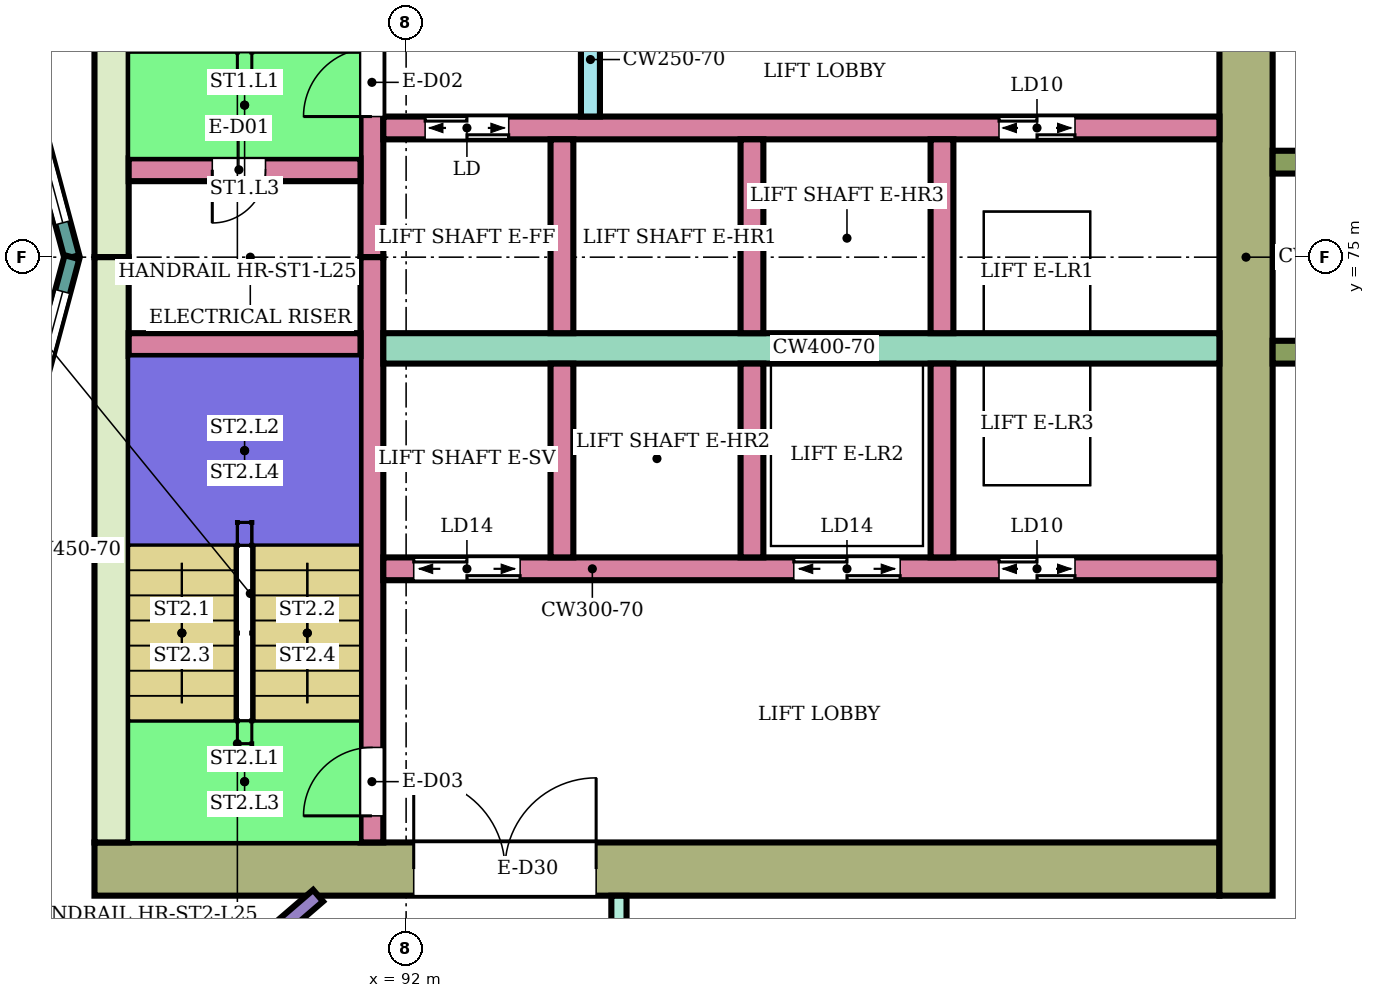
"""IFC4 building model, lengths in metres.
Left out: names, types, materials, properties, quantities, classifications, styles, units other than length and angle.
Written with IfcOpenShell. Run it as: python <this file> out.ifc"""

import sys

from ifc_helpers import new_model, si_unit, direction, frame, frame_2d, origin, place, context, subcontext, project, spatial, rectangle, extrude, element, fill, save


model = new_model("IFC4")
c1 = context("Model", 3, precision=1e-05, world=origin(), true_north=direction((0.0, 1.0)))
c2 = subcontext(c1, "Body", "Model", "MODEL_VIEW")
j1 = project(units=[si_unit("LENGTHUNIT", "METRE"), si_unit("PLANEANGLEUNIT", "RADIAN")], contexts=[c1])
p1 = place(None, origin())
s1 = spatial("IfcSite", under=j1, at=p1, CompositionType="ELEMENT")
p2 = place(p1, origin())
s2 = spatial("IfcBuilding", under=s1, at=p2, CompositionType="ELEMENT")
p3 = place(p2, frame((0.0, 0.0, 109.0)))
s3 = spatial("IfcBuildingStorey", under=s2, at=p3, CompositionType="ELEMENT", Elevation=109.0)
p4 = place(p3, frame((87.9, 66.95, 0.0), z_axis=(0.0, 0.0, 1.0), x_axis=(1.0, 0.0, 0.0)))
e1 = element("IfcWall", 1, at=p4, inside=s3, PredefinedType="SHEAR", context=c2, shape_type="SweptSolid", body=[
    extrude(rectangle(XDim=14.8, YDim=0.7, at=frame_2d((7.4, 0.0))), origin(), (0.0, 0.0, 1.0), 5.28),
])
p5 = place(p4, frame((4.2, 0.0, 0.0)))
e2 = element("IfcOpeningElement", 2, at=p5, cuts=e1, PredefinedType="OPENING", context=c2, shape_type="SweptSolid", body=[
    extrude(rectangle(XDim=2.4, YDim=2.4, at=frame_2d((1.2, 1.2))), frame((0.0, 0.36, 0.0), z_axis=(0.0, -1.0, 0.0), x_axis=(1.0, 0.0, 0.0)), (0.0, 0.0, 1.0), 0.72),
])
for number, where, z_axis, x_axis in (
    (3, (88.125, 75.0, 0.0), (0.0, 0.0, 1.0), (0.0, 1.0, 0.0)),
    (4, (88.125, 67.3, 0.0), (0.0, 0.0, 1.0), (0.0, 1.0, 0.0)),
):
    element("IfcWall", number, at=place(p3, frame(where, z_axis=z_axis, x_axis=x_axis)), inside=s3, PredefinedType="SHEAR", context=c2, shape_type="SweptSolid", body=[
        extrude(rectangle(XDim=7.7, YDim=0.45, at=frame_2d((3.85, 0.0))), origin(), (0.0, 0.0, 1.0), 5.28),
    ])
p6 = place(p3, frame((103.05, 66.6, 0.0), z_axis=(0.0, 0.0, 1.0), x_axis=(0.0, 1.0, 0.0)))
e5 = element("IfcWall", 5, at=p6, inside=s3, PredefinedType="SHEAR", context=c2, shape_type="SweptSolid", body=[
    extrude(rectangle(XDim=16.8, YDim=0.7, at=frame_2d((8.4, 0.0))), origin(), (0.0, 0.0, 1.0), 5.28),
])
p7 = place(p3, frame((91.55, 75.0, 0.0), z_axis=(0.0, 0.0, 1.0), x_axis=(0.0, 1.0, 0.0)))
e6 = element("IfcWall", 6, at=p7, inside=s3, PredefinedType="SHEAR", context=c2, shape_type="SweptSolid", body=[
    extrude(rectangle(XDim=7.7, YDim=0.3, at=frame_2d((3.85, 0.0))), origin(), (0.0, 0.0, 1.0), 5.28),
])
p8 = place(p7, frame((1.85, 0.0, 0.0)))
e7 = element("IfcOpeningElement", 7, at=p8, cuts=e6, PredefinedType="OPENING", context=c2, shape_type="SweptSolid", body=[
    extrude(rectangle(XDim=0.9, YDim=2.1, at=frame_2d((0.45, 1.05))), frame((0.0, 0.16, 0.0), z_axis=(0.0, -1.0, 0.0), x_axis=(1.0, 0.0, 0.0)), (0.0, 0.0, 1.0), 0.32),
])
p9 = place(p3, frame((91.55, 67.3, 0.0), z_axis=(0.0, 0.0, 1.0), x_axis=(0.0, 1.0, 0.0)))
e8 = element("IfcWall", 8, at=p9, inside=s3, PredefinedType="SHEAR", context=c2, shape_type="SweptSolid", body=[
    extrude(rectangle(XDim=7.7, YDim=0.3, at=frame_2d((3.85, 0.0))), origin(), (0.0, 0.0, 1.0), 5.28),
])
p10 = place(p9, frame((0.35, 0.0, 0.0)))
e9 = element("IfcOpeningElement", 9, at=p10, cuts=e8, PredefinedType="OPENING", context=c2, shape_type="SweptSolid", body=[
    extrude(rectangle(XDim=0.9, YDim=2.1, at=frame_2d((0.45, 1.05))), frame((0.0, 0.16, 0.0), z_axis=(0.0, -1.0, 0.0), x_axis=(1.0, 0.0, 0.0)), (0.0, 0.0, 1.0), 0.32),
])
p11 = place(p3, frame((88.35, 76.15, 0.0), z_axis=(0.0, 0.0, 1.0), x_axis=(1.0, 0.0, 0.0)))
e10 = element("IfcWall", 10, at=p11, inside=s3, PredefinedType="SHEAR", context=c2, shape_type="SweptSolid", body=[
    extrude(rectangle(XDim=3.05, YDim=0.3, at=frame_2d((1.525, 0.0))), origin(), (0.0, 0.0, 1.0), 5.28),
])
p12 = place(p11, frame((1.1, 0.0, 0.0)))
e11 = element("IfcOpeningElement", 11, at=p12, cuts=e10, PredefinedType="OPENING", context=c2, shape_type="SweptSolid", body=[
    extrude(rectangle(XDim=0.7, YDim=2.0, at=frame_2d((0.35, 1.0))), frame((0.0, 0.16, 0.0), z_axis=(0.0, -1.0, 0.0), x_axis=(1.0, 0.0, 0.0)), (0.0, 0.0, 1.0), 0.32),
])
p13 = place(p3, frame((88.35, 73.85, 0.0), z_axis=(0.0, 0.0, 1.0), x_axis=(1.0, 0.0, 0.0)))
e12 = element("IfcWall", 12, at=p13, inside=s3, PredefinedType="SHEAR", context=c2, shape_type="SweptSolid", body=[
    extrude(rectangle(XDim=3.05, YDim=0.3, at=frame_2d((1.525, 0.0))), origin(), (0.0, 0.0, 1.0), 5.28),
])
p14 = place(p3, frame((91.7, 76.7, 0.0), z_axis=(0.0, 0.0, 1.0), x_axis=(1.0, 0.0, 0.0)))
e13 = element("IfcWall", 13, at=p14, inside=s3, PredefinedType="SHEAR", context=c2, shape_type="SweptSolid", body=[
    extrude(rectangle(XDim=11.0, YDim=0.3, at=frame_2d((5.5, 0.0))), origin(), (0.0, 0.0, 1.0), 5.28),
])
p15 = place(p14, frame((0.55, 0.0, 0.0)))
e14 = element("IfcOpeningElement", 14, at=p15, cuts=e13, PredefinedType="OPENING", context=c2, shape_type="SweptSolid", body=[
    extrude(rectangle(XDim=1.1, YDim=2.1, at=frame_2d((0.55, 1.05))), frame((0.0, 0.16, 0.0), z_axis=(0.0, -1.0, 0.0), x_axis=(1.0, 0.0, 0.0)), (0.0, 0.0, 1.0), 0.32),
])
p16 = place(p14, frame((8.1, 0.0, 0.0)))
e15 = element("IfcOpeningElement", 15, at=p16, cuts=e13, PredefinedType="OPENING", context=c2, shape_type="SweptSolid", body=[
    extrude(rectangle(XDim=1.0, YDim=2.1, at=frame_2d((0.5, 1.05))), frame((0.0, 0.16, 0.0), z_axis=(0.0, -1.0, 0.0), x_axis=(1.0, 0.0, 0.0)), (0.0, 0.0, 1.0), 0.32),
])
p17 = place(p3, frame((91.7, 73.8, 0.0), z_axis=(0.0, 0.0, 1.0), x_axis=(1.0, 0.0, 0.0)))
e16 = element("IfcWall", 16, at=p17, inside=s3, PredefinedType="SHEAR", context=c2, shape_type="SweptSolid", body=[
    extrude(rectangle(XDim=11.0, YDim=0.4, at=frame_2d((5.5, 0.0))), origin(), (0.0, 0.0, 1.0), 5.28),
])
p18 = place(p3, frame((91.7, 70.9, 0.0), z_axis=(0.0, 0.0, 1.0), x_axis=(1.0, 0.0, 0.0)))
e17 = element("IfcWall", 17, at=p18, inside=s3, PredefinedType="SHEAR", context=c2, shape_type="SweptSolid", body=[
    extrude(rectangle(XDim=11.0, YDim=0.3, at=frame_2d((5.5, 0.0))), origin(), (0.0, 0.0, 1.0), 5.28),
])
p19 = place(p18, frame((0.4, 0.0, 0.0)))
e18 = element("IfcOpeningElement", 18, at=p19, cuts=e17, PredefinedType="OPENING", context=c2, shape_type="SweptSolid", body=[
    extrude(rectangle(XDim=1.4, YDim=2.1, at=frame_2d((0.7, 1.05))), frame((0.0, 0.16, 0.0), z_axis=(0.0, -1.0, 0.0), x_axis=(1.0, 0.0, 0.0)), (0.0, 0.0, 1.0), 0.32),
])
p20 = place(p18, frame((5.4, 0.0, 0.0)))
e19 = element("IfcOpeningElement", 19, at=p20, cuts=e17, PredefinedType="OPENING", context=c2, shape_type="SweptSolid", body=[
    extrude(rectangle(XDim=1.4, YDim=2.1, at=frame_2d((0.7, 1.05))), frame((0.0, 0.16, 0.0), z_axis=(0.0, -1.0, 0.0), x_axis=(1.0, 0.0, 0.0)), (0.0, 0.0, 1.0), 0.32),
])
p21 = place(p18, frame((8.1, 0.0, 0.0)))
e20 = element("IfcOpeningElement", 20, at=p21, cuts=e17, PredefinedType="OPENING", context=c2, shape_type="SweptSolid", body=[
    extrude(rectangle(XDim=1.0, YDim=2.1, at=frame_2d((0.5, 1.05))), frame((0.0, 0.16, 0.0), z_axis=(0.0, -1.0, 0.0), x_axis=(1.0, 0.0, 0.0)), (0.0, 0.0, 1.0), 0.32),
])
for number, where, z_axis, x_axis in (
    (21, (94.05, 74.0, 0.0), (0.0, 0.0, 1.0), (0.0, 1.0, 0.0)),
    (22, (96.55, 74.0, 0.0), (0.0, 0.0, 1.0), (0.0, 1.0, 0.0)),
    (23, (99.05, 74.0, 0.0), (0.0, 0.0, 1.0), (0.0, 1.0, 0.0)),
    (24, (94.05, 71.05, 0.0), (0.0, 0.0, 1.0), (0.0, 1.0, 0.0)),
    (25, (96.55, 71.05, 0.0), (0.0, 0.0, 1.0), (0.0, 1.0, 0.0)),
    (26, (99.05, 71.05, 0.0), (0.0, 0.0, 1.0), (0.0, 1.0, 0.0)),
):
    element("IfcWall", number, at=place(p3, frame(where, z_axis=z_axis, x_axis=x_axis)), inside=s3, PredefinedType="SHEAR", context=c2, shape_type="SweptSolid", body=[
        extrude(rectangle(XDim=2.55, YDim=0.3, at=frame_2d((1.275, 0.0))), origin(), (0.0, 0.0, 1.0), 5.28),
    ])
p22 = place(p3, frame((94.425, 76.85, 0.0), z_axis=(0.0, 0.0, 1.0), x_axis=(0.0, 1.0, 0.0)))
e27 = element("IfcWall", 27, at=p22, inside=s3, PredefinedType="SHEAR", context=c2, shape_type="SweptSolid", body=[
    extrude(rectangle(XDim=1.5, YDim=0.25, at=frame_2d((0.75, 0.0))), origin(), (0.0, 0.0, 1.0), 5.28),
])
for number, where, z_axis, x_axis in (
    (28, (103.4, 73.75, 0.0), (0.0, 0.0, 1.0), (1.0, 0.0, 0.0)),
    (29, (103.4, 76.25, 0.0), (0.0, 0.0, 1.0), (1.0, 0.0, 0.0)),
):
    element("IfcWall", number, at=place(p3, frame(where, z_axis=z_axis, x_axis=x_axis)), inside=s3, PredefinedType="NOTDEFINED", context=c2, shape_type="SweptSolid", body=[
        extrude(rectangle(XDim=2.416, YDim=0.3, at=frame_2d((1.208, 0.0))), origin(), (0.0, 0.0, 1.0), 5.6),
    ])
p23 = place(p3, frame((87.604, 75.0, 0.0), z_axis=(0.0, 0.0, 1.0), x_axis=(-0.258789828301, 0.965933654434, 0.0)))
e30 = element("IfcWall", 30, at=p23, inside=s3, PredefinedType="NOTDEFINED", context=c2, shape_type="SweptSolid", body=[
    extrude(rectangle(XDim=3.936, YDim=0.2, at=frame_2d((1.968, 0.0))), origin(), (0.0, 0.0, 1.0), 5.6),
])
p24 = place(p23, frame((0.468, 0.0, 0.9)))
e31 = element("IfcOpeningElement", 31, at=p24, cuts=e30, PredefinedType="OPENING", context=c2, shape_type="SweptSolid", body=[
    extrude(rectangle(XDim=3.0, YDim=2.3, at=frame_2d((1.5, 1.15))), frame((0.0, 0.11, 0.0), z_axis=(0.0, -1.0, 0.0), x_axis=(1.0, 0.0, 0.0)), (0.0, 0.0, 1.0), 0.22),
])
p25 = place(p3, frame((86.585, 71.198, 0.0), z_axis=(0.0, 0.0, 1.0), x_axis=(0.258789828301, 0.965933654434, 0.0)))
e32 = element("IfcWall", 32, at=p25, inside=s3, PredefinedType="NOTDEFINED", context=c2, shape_type="SweptSolid", body=[
    extrude(rectangle(XDim=3.936, YDim=0.2, at=frame_2d((1.968, 0.0))), origin(), (0.0, 0.0, 1.0), 5.6),
])
p26 = place(p25, frame((0.468, 0.0, 0.9)))
e33 = element("IfcOpeningElement", 33, at=p26, cuts=e32, PredefinedType="OPENING", context=c2, shape_type="SweptSolid", body=[
    extrude(rectangle(XDim=3.0, YDim=2.3, at=frame_2d((1.5, 1.15))), frame((0.0, 0.11, 0.0), z_axis=(0.0, -1.0, 0.0), x_axis=(1.0, 0.0, 0.0)), (0.0, 0.0, 1.0), 0.22),
])
p27 = place(p3, frame((86.877, 63.189, 0.0), z_axis=(0.0, 0.0, 1.0), x_axis=(0.758075808328, 0.652166442581, 0.0)))
e34 = element("IfcWall", 34, at=p27, inside=s3, PredefinedType="PARTITIONING", context=c2, shape_type="SweptSolid", body=[
    extrude(rectangle(XDim=5.23, YDim=0.2, at=frame_2d((2.615, 0.0))), origin(), (0.0, 0.0, 1.0), 5.15),
])
p28 = place(p27, frame((2.015, 0.0, 0.0)))
e35 = element("IfcOpeningElement", 35, at=p28, cuts=e34, PredefinedType="OPENING", context=c2, shape_type="SweptSolid", body=[
    extrude(rectangle(XDim=1.2, YDim=2.4, at=frame_2d((0.6, 1.2))), frame((0.0, 0.11, 0.0), z_axis=(0.0, -1.0, 0.0), x_axis=(1.0, 0.0, 0.0)), (0.0, 0.0, 1.0), 0.22),
])
p29 = place(p3, frame((94.8, 65.1, 0.0), z_axis=(0.0, 0.0, 1.0), x_axis=(0.0, 1.0, 0.0)))
e36 = element("IfcWall", 36, at=p29, inside=s3, PredefinedType="PARTITIONING", context=c2, shape_type="SweptSolid", body=[
    extrude(rectangle(XDim=1.499, YDim=0.2, at=frame_2d((0.75, 0.0))), origin(), (0.0, 0.0, 1.0), 5.15),
])
p30 = place(p24, origin())
e37 = element("IfcWindow", 37, at=p30, inside=s3, PartitioningType="SINGLE_PANEL", PredefinedType="WINDOW", context=c2, shape_type="SweptSolid", body=[
    extrude(rectangle(XDim=3.0, YDim=2.3, at=frame_2d((1.5, 1.15))), frame((0.0, 0.03, 0.0), z_axis=(0.0, -1.0, 0.0), x_axis=(1.0, 0.0, 0.0)), (0.0, 0.0, 1.0), 0.06),
])
fill(e31, e37)
p31 = place(p26, origin())
e38 = element("IfcWindow", 38, at=p31, inside=s3, PartitioningType="SINGLE_PANEL", PredefinedType="WINDOW", context=c2, shape_type="SweptSolid", body=[
    extrude(rectangle(XDim=3.0, YDim=2.3, at=frame_2d((1.5, 1.15))), frame((0.0, 0.03, 0.0), z_axis=(0.0, -1.0, 0.0), x_axis=(1.0, 0.0, 0.0)), (0.0, 0.0, 1.0), 0.06),
])
fill(e33, e38)
p32 = place(p12, frame((0.7, 0.0, 0.0), z_axis=(0.0, 0.0, 1.0), x_axis=(-1.0, 0.0, 0.0)))
e39 = element("IfcDoor", 39, at=p32, inside=s3, OperationType="SINGLE_SWING_RIGHT", PredefinedType="DOOR", context=c2, shape_type="SweptSolid", body=[
    extrude(rectangle(XDim=0.7, YDim=2.0, at=frame_2d((0.35, 1.0))), frame((0.0, 0.025, 0.0), z_axis=(0.0, -1.0, 0.0), x_axis=(1.0, 0.0, 0.0)), (0.0, 0.0, 1.0), 0.05),
])
fill(e11, e39)
p33 = place(p8, origin())
e40 = element("IfcDoor", 40, at=p33, inside=s3, OperationType="SINGLE_SWING_LEFT", PredefinedType="DOOR", context=c2, shape_type="SweptSolid", body=[
    extrude(rectangle(XDim=0.9, YDim=2.1, at=frame_2d((0.45, 1.05))), frame((0.0, 0.025, 0.0), z_axis=(0.0, -1.0, 0.0), x_axis=(1.0, 0.0, 0.0)), (0.0, 0.0, 1.0), 0.05),
])
fill(e7, e40)
p34 = place(p10, origin())
e41 = element("IfcDoor", 41, at=p34, inside=s3, OperationType="SINGLE_SWING_LEFT", PredefinedType="DOOR", context=c2, shape_type="SweptSolid", body=[
    extrude(rectangle(XDim=0.9, YDim=2.1, at=frame_2d((0.45, 1.05))), frame((0.0, 0.025, 0.0), z_axis=(0.0, -1.0, 0.0), x_axis=(1.0, 0.0, 0.0)), (0.0, 0.0, 1.0), 0.05),
])
fill(e9, e41)
p35 = place(p15, origin())
e42 = element("IfcDoor", 42, at=p35, inside=s3, OperationType="DOUBLE_DOOR_SLIDING", PredefinedType="DOOR", context=c2, shape_type="SweptSolid", body=[
    extrude(rectangle(XDim=1.1, YDim=2.1, at=frame_2d((0.55, 1.05))), frame((0.0, 0.025, 0.0), z_axis=(0.0, -1.0, 0.0), x_axis=(1.0, 0.0, 0.0)), (0.0, 0.0, 1.0), 0.05),
])
fill(e14, e42)
p36 = place(p16, origin())
e43 = element("IfcDoor", 43, at=p36, inside=s3, OperationType="DOUBLE_DOOR_SLIDING", PredefinedType="DOOR", context=c2, shape_type="SweptSolid", body=[
    extrude(rectangle(XDim=1.0, YDim=2.1, at=frame_2d((0.5, 1.05))), frame((0.0, 0.025, 0.0), z_axis=(0.0, -1.0, 0.0), x_axis=(1.0, 0.0, 0.0)), (0.0, 0.0, 1.0), 0.05),
])
fill(e15, e43)
p37 = place(p19, origin())
e44 = element("IfcDoor", 44, at=p37, inside=s3, OperationType="DOUBLE_DOOR_SLIDING", PredefinedType="DOOR", context=c2, shape_type="SweptSolid", body=[
    extrude(rectangle(XDim=1.4, YDim=2.1, at=frame_2d((0.7, 1.05))), frame((0.0, 0.025, 0.0), z_axis=(0.0, -1.0, 0.0), x_axis=(1.0, 0.0, 0.0)), (0.0, 0.0, 1.0), 0.05),
])
fill(e18, e44)
p38 = place(p20, origin())
e45 = element("IfcDoor", 45, at=p38, inside=s3, OperationType="DOUBLE_DOOR_SLIDING", PredefinedType="DOOR", context=c2, shape_type="SweptSolid", body=[
    extrude(rectangle(XDim=1.4, YDim=2.1, at=frame_2d((0.7, 1.05))), frame((0.0, 0.025, 0.0), z_axis=(0.0, -1.0, 0.0), x_axis=(1.0, 0.0, 0.0)), (0.0, 0.0, 1.0), 0.05),
])
fill(e19, e45)
p39 = place(p21, origin())
e46 = element("IfcDoor", 46, at=p39, inside=s3, OperationType="DOUBLE_DOOR_SLIDING", PredefinedType="DOOR", context=c2, shape_type="SweptSolid", body=[
    extrude(rectangle(XDim=1.0, YDim=2.1, at=frame_2d((0.5, 1.05))), frame((0.0, 0.025, 0.0), z_axis=(0.0, -1.0, 0.0), x_axis=(1.0, 0.0, 0.0)), (0.0, 0.0, 1.0), 0.05),
])
fill(e20, e46)
p40 = place(p5, origin())
e47 = element("IfcDoor", 47, at=p40, inside=s3, OperationType="DOUBLE_DOOR_SINGLE_SWING", PredefinedType="DOOR", context=c2, shape_type="SweptSolid", body=[
    extrude(rectangle(XDim=2.4, YDim=2.4, at=frame_2d((1.2, 1.2))), frame((0.0, 0.025, 0.0), z_axis=(0.0, -1.0, 0.0), x_axis=(1.0, 0.0, 0.0)), (0.0, 0.0, 1.0), 0.05),
])
fill(e2, e47)
save(model, sys.argv[1])
